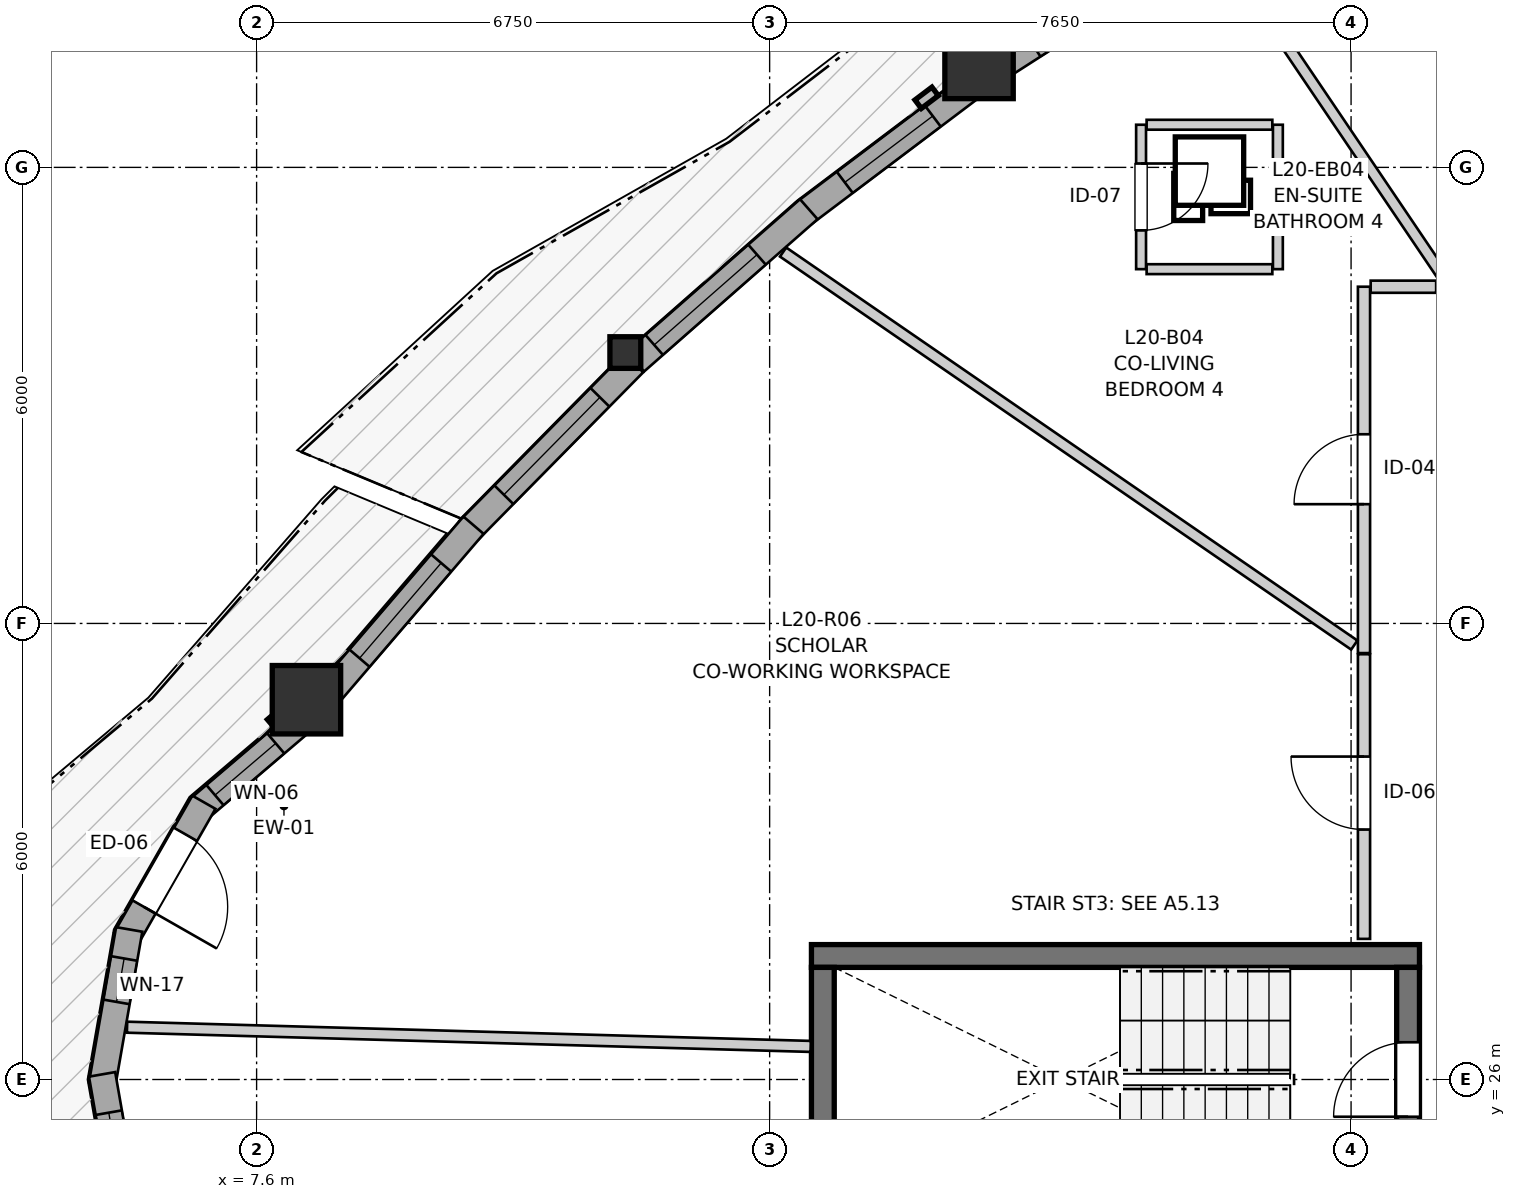
"""IFC4 building model, lengths in metres.
Left out: names, types, materials, properties, quantities, classifications, styles, units other than length and angle.
Written with IfcOpenShell. Run it as: python <this file> out.ifc"""

import sys

from ifc_helpers import new_model, si_unit, direction, frame, frame_2d, origin, origin_2d, place, context, subcontext, project, spatial, rectangle, i_section, extrude, source, transform, mapped, element, fill, save


model = new_model("IFC4")
c1 = context("Model", 3, precision=1e-05, world=origin(), true_north=direction((0.0, 1.0)))
c2 = subcontext(c1, "Body", "Model", "MODEL_VIEW")
j1 = project(units=[si_unit("LENGTHUNIT", "METRE"), si_unit("PLANEANGLEUNIT", "RADIAN")], contexts=[c1])
p1 = place(None, origin())
s1 = spatial("IfcSite", under=j1, at=p1, CompositionType="ELEMENT")
p2 = place(p1, origin())
s2 = spatial("IfcBuilding", under=s1, at=p2, CompositionType="ELEMENT")
p3 = place(p2, frame((0.0, 0.0, 70.4)))
s3 = spatial("IfcBuildingStorey", under=s2, at=p3, CompositionType="ELEMENT", Elevation=70.4)
p4 = place(p3, frame((22.9, 27.625, 0.0), z_axis=(0.0, 0.0, 1.0), x_axis=(-1.0, 0.0, 0.0)))
e1 = element("IfcWall", 1, at=p4, inside=s3, PredefinedType="SHEAR", context=c2, shape_type="SweptSolid", body=[
    extrude(rectangle(XDim=8.0, YDim=0.3, at=frame_2d((4.0, 0.0))), origin(), (0.0, 0.0, 1.0), 2.95),
])
p5 = place(p3, frame((15.05, 27.475, 0.0), z_axis=(0.0, 0.0, 1.0), x_axis=(0.0, -1.0, 0.0)))
e2 = element("IfcWall", 2, at=p5, inside=s3, PredefinedType="SHEAR", context=c2, shape_type="SweptSolid", body=[
    extrude(rectangle(XDim=2.95, YDim=0.3, at=frame_2d((1.475, 0.0))), origin(), (0.0, 0.0, 1.0), 2.95),
])
p6 = place(p3, frame((22.75, 24.525, 0.0), z_axis=(0.0, 0.0, 1.0), x_axis=(0.0, 1.0, 0.0)))
e3 = element("IfcWall", 3, at=p6, inside=s3, PredefinedType="SHEAR", context=c2, shape_type="SweptSolid", body=[
    extrude(rectangle(XDim=2.95, YDim=0.3, at=frame_2d((1.475, 0.0))), origin(), (0.0, 0.0, 1.0), 2.95),
])
p7 = place(p6, frame((0.985, 0.0, 0.0)))
e4 = element("IfcOpeningElement", 4, at=p7, cuts=e3, PredefinedType="OPENING", context=c2, shape_type="SweptSolid", body=[
    extrude(rectangle(XDim=0.98, YDim=2.15, at=frame_2d((0.49, 1.075))), frame((0.0, 0.16, 0.0), z_axis=(0.0, -1.0, 0.0), x_axis=(1.0, 0.0, 0.0)), (0.0, 0.0, 1.0), 0.32),
])
m1 = source(origin(), c2, "Body", "SweptSolid", [
    extrude(rectangle(XDim=0.9, YDim=0.9, at=origin_2d()), origin(), (0.0, 0.0, 1.0), 2.95),
])
for number, where, z_axis, x_axis in (
    (5, (8.256, 30.997, 0.0), (0.0, 0.0, 1.0), (1.0, 0.0, 0.0)),
    (6, (17.105, 39.354, 0.0), (0.0, 0.0, 1.0), (1.0, 0.0, 0.0)),
):
    element("IfcColumn", number, at=place(p3, frame(where, z_axis=z_axis, x_axis=x_axis)), inside=s3, PredefinedType="COLUMN", context=c2, shape_type="MappedRepresentation", body=[
        mapped(m1, transform((0.0, 0.0, 0.0), x_axis=(1.0, 0.0, 0.0), y_axis=(0.0, 1.0, 0.0), z_axis=(0.0, 0.0, 1.0), scale=1.0)),
    ])
m2 = source(origin(), c2, "Body", "SweptSolid", [
    extrude(i_section(OverallWidth=0.406, OverallDepth=0.416, WebThickness=0.027, FlangeThickness=0.044, FilletRadius=0.015, at=origin_2d()), origin(), (0.0, 0.0, 1.0), 2.95),
])
p8 = place(p3, frame((12.451, 35.564, 0.0), z_axis=(0.0, 0.0, 1.0), x_axis=(1.0, 0.0, 0.0)))
e7 = element("IfcColumn", 7, at=p8, inside=s3, PredefinedType="PILASTER", context=c2, shape_type="MappedRepresentation", body=[
    mapped(m2, transform((0.0, 0.0, 0.0), x_axis=(1.0, 0.0, 0.0), y_axis=(0.0, 1.0, 0.0), z_axis=(0.0, 0.0, 1.0), scale=1.0)),
])
p9 = place(p3, frame((8.198, 30.717, 0.0), z_axis=(0.0, 0.0, 1.0), x_axis=(-0.761176639947, -0.648544618973, 0.0)))
e8 = element("IfcWall", 8, at=p9, inside=s3, PredefinedType="SOLIDWALL", context=c2, shape_type="SweptSolid", body=[
    extrude(rectangle(XDim=1.81, YDim=0.35, at=frame_2d((0.905, 0.0))), origin(), (0.0, 0.0, 1.0), 2.48),
])
p10 = place(p9, frame((0.455, 0.0, 0.82)))
e9 = element("IfcOpeningElement", 9, at=p10, cuts=e8, PredefinedType="OPENING", context=c2, shape_type="SweptSolid", body=[
    extrude(rectangle(XDim=1.05, YDim=1.45, at=frame_2d((0.525, 0.725))), frame((0.0, 0.185, 0.0), z_axis=(0.0, -1.0, 0.0), x_axis=(1.0, 0.0, 0.0)), (0.0, 0.0, 1.0), 0.37),
])
p11 = place(p3, frame((6.906, 29.647, 0.0), z_axis=(0.0, 0.0, 1.0), x_axis=(-0.496037473582, -0.868301114132, 0.0)))
e10 = element("IfcWall", 10, at=p11, inside=s3, PredefinedType="SOLIDWALL", context=c2, shape_type="SweptSolid", body=[
    extrude(rectangle(XDim=2.073, YDim=0.35, at=frame_2d((1.037, 0.0))), origin(), (0.0, 0.0, 1.0), 2.48),
])
p12 = place(p11, frame((0.487, 0.0, 0.0)))
e11 = element("IfcOpeningElement", 11, at=p12, cuts=e10, PredefinedType="OPENING", context=c2, shape_type="SweptSolid", body=[
    extrude(rectangle(XDim=1.1, YDim=2.1, at=frame_2d((0.55, 1.05))), frame((0.0, 0.185, 0.0), z_axis=(0.0, -1.0, 0.0), x_axis=(1.0, 0.0, 0.0)), (0.0, 0.0, 1.0), 0.37),
])
p13 = place(p3, frame((5.924, 27.975, 0.0), z_axis=(0.0, 0.0, 1.0), x_axis=(-0.172166087538, -0.985067935881, 0.0)))
e12 = element("IfcWall", 12, at=p13, inside=s3, PredefinedType="SOLIDWALL", context=c2, shape_type="SweptSolid", body=[
    extrude(rectangle(XDim=2.073, YDim=0.35, at=frame_2d((1.037, 0.0))), origin(), (0.0, 0.0, 1.0), 2.48),
])
p14 = place(p13, frame((0.388, 0.0, 0.82)))
e13 = element("IfcOpeningElement", 13, at=p14, cuts=e12, PredefinedType="OPENING", context=c2, shape_type="SweptSolid", body=[
    extrude(rectangle(XDim=0.58, YDim=1.35, at=frame_2d((0.29, 0.675))), frame((0.0, 0.185, 0.0), z_axis=(0.0, -1.0, 0.0), x_axis=(1.0, 0.0, 0.0)), (0.0, 0.0, 1.0), 0.37),
])
p15 = place(p3, frame((5.567, 26.068, 0.0), z_axis=(0.0, 0.0, 1.0), x_axis=(0.172166087538, -0.985067935881, 0.0)))
e14 = element("IfcWall", 14, at=p15, inside=s3, PredefinedType="SOLIDWALL", context=c2, shape_type="SweptSolid", body=[
    extrude(rectangle(XDim=2.073, YDim=0.35, at=frame_2d((1.037, 0.0))), origin(), (0.0, 0.0, 1.0), 2.48),
])
p16 = place(p15, frame((0.511, 0.0, 0.82)))
e15 = element("IfcOpeningElement", 15, at=p16, cuts=e14, PredefinedType="OPENING", context=c2, shape_type="SweptSolid", body=[
    extrude(rectangle(XDim=1.05, YDim=1.45, at=frame_2d((0.525, 0.725))), frame((0.0, 0.185, 0.0), z_axis=(0.0, -1.0, 0.0), x_axis=(1.0, 0.0, 0.0)), (0.0, 0.0, 1.0), 0.37),
])
p17 = place(p3, frame((19.73, 40.831, 0.0), z_axis=(0.0, 0.0, 1.0), x_axis=(-0.841577423868, -0.540136500929, 0.0)))
e16 = element("IfcWall", 16, at=p17, inside=s3, PredefinedType="SOLIDWALL", context=c2, shape_type="SweptSolid", body=[
    extrude(rectangle(XDim=2.782, YDim=0.35, at=frame_2d((1.391, 0.0))), origin(), (0.0, 0.0, 1.0), 2.48),
])
p18 = place(p17, frame((0.521, 0.0, 0.82)))
e17 = element("IfcOpeningElement", 17, at=p18, cuts=e16, PredefinedType="OPENING", context=c2, shape_type="SweptSolid", body=[
    extrude(rectangle(XDim=1.75, YDim=1.3, at=frame_2d((0.875, 0.65))), frame((0.0, 0.185, 0.0), z_axis=(0.0, -1.0, 0.0), x_axis=(1.0, 0.0, 0.0)), (0.0, 0.0, 1.0), 0.37),
])
p19 = place(p3, frame((17.031, 39.079, 0.0), z_axis=(0.0, 0.0, 1.0), x_axis=(-0.798385341516, -0.602146864521, 0.0)))
e18 = element("IfcWall", 18, at=p19, inside=s3, PredefinedType="SOLIDWALL", context=c2, shape_type="SweptSolid", body=[
    extrude(rectangle(XDim=2.799, YDim=0.35, at=frame_2d((1.4, 0.0))), origin(), (0.0, 0.0, 1.0), 2.48),
])
p20 = place(p19, frame((0.67, 0.0, 0.82)))
e19 = element("IfcOpeningElement", 19, at=p20, cuts=e18, PredefinedType="OPENING", context=c2, shape_type="SweptSolid", body=[
    extrude(rectangle(XDim=1.45, YDim=1.25, at=frame_2d((0.725, 0.625))), frame((0.0, 0.185, 0.0), z_axis=(0.0, -1.0, 0.0), x_axis=(1.0, 0.0, 0.0)), (0.0, 0.0, 1.0), 0.37),
])
p21 = place(p3, frame((14.865, 37.45, 0.0), z_axis=(0.0, 0.0, 1.0), x_axis=(-0.751505335107, -0.659727012715, 0.0)))
e20 = element("IfcWall", 20, at=p21, inside=s3, PredefinedType="SOLIDWALL", context=c2, shape_type="SweptSolid", body=[
    extrude(rectangle(XDim=3.038, YDim=0.35, at=frame_2d((1.519, 0.0))), origin(), (0.0, 0.0, 1.0), 2.48),
])
p22 = place(p21, frame((0.906, 0.0, 0.82)))
e21 = element("IfcOpeningElement", 21, at=p22, cuts=e20, PredefinedType="OPENING", context=c2, shape_type="SweptSolid", body=[
    extrude(rectangle(XDim=1.8, YDim=1.45, at=frame_2d((0.9, 0.725))), frame((0.0, 0.185, 0.0), z_axis=(0.0, -1.0, 0.0), x_axis=(1.0, 0.0, 0.0)), (0.0, 0.0, 1.0), 0.37),
])
p23 = place(p3, frame((12.562, 35.427, 0.0), z_axis=(0.0, 0.0, 1.0), x_axis=(-0.701949387032, -0.712226830473, 0.0)))
e22 = element("IfcWall", 22, at=p23, inside=s3, PredefinedType="SOLIDWALL", context=c2, shape_type="SweptSolid", body=[
    extrude(rectangle(XDim=3.088, YDim=0.35, at=frame_2d((1.544, 0.0))), origin(), (0.0, 0.0, 1.0), 2.48),
])
p24 = place(p23, frame((0.634, 0.0, 0.82)))
e23 = element("IfcOpeningElement", 23, at=p24, cuts=e22, PredefinedType="OPENING", context=c2, shape_type="SweptSolid", body=[
    extrude(rectangle(XDim=1.8, YDim=1.45, at=frame_2d((0.9, 0.725))), frame((0.0, 0.185, 0.0), z_axis=(0.0, -1.0, 0.0), x_axis=(1.0, 0.0, 0.0)), (0.0, 0.0, 1.0), 0.37),
])
p25 = place(p3, frame((10.454, 33.292, 0.0), z_axis=(0.0, 0.0, 1.0), x_axis=(-0.650791373456, -0.759256602365, 0.0)))
e24 = element("IfcWall", 24, at=p25, inside=s3, PredefinedType="SOLIDWALL", context=c2, shape_type="SweptSolid", body=[
    extrude(rectangle(XDim=2.949, YDim=0.35, at=frame_2d((1.474, 0.0))), origin(), (0.0, 0.0, 1.0), 2.48),
])
p26 = place(p25, frame((0.654, 0.0, 0.82)))
e25 = element("IfcOpeningElement", 25, at=p26, cuts=e24, PredefinedType="OPENING", context=c2, shape_type="SweptSolid", body=[
    extrude(rectangle(XDim=1.65, YDim=1.45, at=frame_2d((0.825, 0.725))), frame((0.0, 0.185, 0.0), z_axis=(0.0, -1.0, 0.0), x_axis=(1.0, 0.0, 0.0)), (0.0, 0.0, 1.0), 0.37),
])
p27 = place(p3, frame((22.17, 31.61, 0.0), z_axis=(0.0, 0.0, 1.0), x_axis=(0.0, 1.0, 0.0)))
e26 = element("IfcWall", 26, at=p27, inside=s3, PredefinedType="PARTITIONING", context=c2, shape_type="SweptSolid", body=[
    extrude(rectangle(XDim=4.82, YDim=0.16, at=frame_2d((2.41, 0.0))), origin(), (0.0, 0.0, 1.0), 2.95),
])
p28 = place(p27, frame((1.959, 0.0, 0.0)))
e27 = element("IfcOpeningElement", 27, at=p28, cuts=e26, PredefinedType="OPENING", context=c2, shape_type="SweptSolid", body=[
    extrude(rectangle(XDim=0.92, YDim=2.1, at=frame_2d((0.46, 1.05))), frame((0.0, 0.09, 0.0), z_axis=(0.0, -1.0, 0.0), x_axis=(1.0, 0.0, 0.0)), (0.0, 0.0, 1.0), 0.18),
])
p29 = place(p3, frame((22.17, 27.85, 0.0), z_axis=(0.0, 0.0, 1.0), x_axis=(0.0, 1.0, 0.0)))
e28 = element("IfcWall", 28, at=p29, inside=s3, PredefinedType="PARTITIONING", context=c2, shape_type="SweptSolid", body=[
    extrude(rectangle(XDim=3.745, YDim=0.16, at=frame_2d((1.873, 0.0))), origin(), (0.0, 0.0, 1.0), 2.95),
])
p30 = place(p29, frame((1.438, 0.0, 0.0)))
e29 = element("IfcOpeningElement", 29, at=p30, cuts=e28, PredefinedType="OPENING", context=c2, shape_type="SweptSolid", body=[
    extrude(rectangle(XDim=0.96, YDim=2.1, at=frame_2d((0.48, 1.05))), frame((0.0, 0.09, 0.0), z_axis=(0.0, -1.0, 0.0), x_axis=(1.0, 0.0, 0.0)), (0.0, 0.0, 1.0), 0.18),
])
p31 = place(p3, frame((19.237, 38.561, 0.0), z_axis=(0.0, 0.0, 1.0), x_axis=(0.0, -1.0, 0.0)))
e30 = element("IfcWall", 30, at=p31, inside=s3, PredefinedType="PARTITIONING", context=c2, shape_type="SweptSolid", body=[
    extrude(rectangle(XDim=1.9, YDim=0.13, at=frame_2d((0.95, 0.0))), origin(), (0.0, 0.0, 1.0), 2.95),
])
p32 = place(p31, frame((0.51, 0.0, 0.0)))
e31 = element("IfcOpeningElement", 31, at=p32, cuts=e30, PredefinedType="OPENING", context=c2, shape_type="SweptSolid", body=[
    extrude(rectangle(XDim=0.88, YDim=2.05, at=frame_2d((0.44, 1.025))), frame((0.0, 0.075, 0.0), z_axis=(0.0, -1.0, 0.0), x_axis=(1.0, 0.0, 0.0)), (0.0, 0.0, 1.0), 0.15),
])
p33 = place(p3, frame((14.527, 36.886, 0.0), z_axis=(0.0, 0.0, 1.0), x_axis=(0.823849772282, -0.566808215106, 0.0)))
e32 = element("IfcWall", 32, at=p33, inside=s3, PredefinedType="PARTITIONING", context=c2, shape_type="SweptSolid", body=[
    extrude(rectangle(XDim=9.122, YDim=0.145, at=frame_2d((4.561, 0.0))), origin(), (0.0, 0.0, 1.0), 2.95),
])
p34 = place(p3, frame((5.896, 26.688, 0.0), z_axis=(0.0, 0.0, 1.0), x_axis=(0.999604843423, -0.028109731489, 0.0)))
e33 = element("IfcWall", 33, at=p34, inside=s3, PredefinedType="PARTITIONING", context=c2, shape_type="SweptSolid", body=[
    extrude(rectangle(XDim=8.998, YDim=0.145, at=frame_2d((4.499, 0.0))), origin(), (0.0, 0.0, 1.0), 2.95),
])
p35 = place(p3, frame((20.277, 40.906, 0.0), z_axis=(0.0, 0.0, 1.0), x_axis=(0.559905741259, -0.828556311246, 0.0)))
e34 = element("IfcWall", 34, at=p35, inside=s3, PredefinedType="PARTITIONING", context=c2, shape_type="SweptSolid", body=[
    extrude(rectangle(XDim=5.249, YDim=0.145, at=frame_2d((2.625, 0.0))), origin(), (0.0, 0.0, 1.0), 2.95),
])
p36 = place(p3, frame((21.037, 36.661, 0.0), z_axis=(0.0, 0.0, 1.0), x_axis=(0.0, 1.0, 0.0)))
e35 = element("IfcWall", 35, at=p36, inside=s3, PredefinedType="PARTITIONING", context=c2, shape_type="SweptSolid", body=[
    extrude(rectangle(XDim=1.9, YDim=0.13, at=frame_2d((0.95, 0.0))), origin(), (0.0, 0.0, 1.0), 2.95),
])
for number, where, z_axis, x_axis in (
    (36, (19.31, 38.561, 0.0), (0.0, 0.0, 1.0), (1.0, 0.0, 0.0)),
    (37, (19.31, 36.661, 0.0), (0.0, 0.0, 1.0), (1.0, 0.0, 0.0)),
):
    element("IfcWall", number, at=place(p3, frame(where, z_axis=z_axis, x_axis=x_axis)), inside=s3, PredefinedType="PARTITIONING", context=c2, shape_type="SweptSolid", body=[
        extrude(rectangle(XDim=1.654, YDim=0.13, at=frame_2d((0.827, 0.0))), origin(), (0.0, 0.0, 1.0), 2.95),
    ])
p37 = place(p3, frame((22.258, 36.43, 0.0), z_axis=(0.0, 0.0, 1.0), x_axis=(1.0, 0.0, 0.0)))
e38 = element("IfcWall", 38, at=p37, inside=s3, PredefinedType="PARTITIONING", context=c2, shape_type="SweptSolid", body=[
    extrude(rectangle(XDim=0.861, YDim=0.16, at=frame_2d((0.431, 0.0))), origin(), (0.0, 0.0, 1.0), 2.95),
])
m3 = source(origin(), c2, "Body", "SweptSolid", [
    extrude(rectangle(XDim=1.05, YDim=1.45, at=frame_2d((0.525, 0.725))), frame((0.0, 0.03, 0.0), z_axis=(0.0, -1.0, 0.0), x_axis=(1.0, 0.0, 0.0)), (0.0, 0.0, 1.0), 0.06),
])
p38 = place(p10, origin())
e39 = element("IfcWindow", 39, at=p38, inside=s3, PartitioningType="SINGLE_PANEL", PredefinedType="WINDOW", context=c2, shape_type="MappedRepresentation", body=[
    mapped(m3, transform((0.0, 0.0, 0.0), x_axis=(1.0, 0.0, 0.0), y_axis=(0.0, 1.0, 0.0), z_axis=(0.0, 0.0, 1.0), scale=1.0)),
])
fill(e9, e39)
m4 = source(origin(), c2, "Body", "SweptSolid", [
    extrude(rectangle(XDim=1.1, YDim=2.1, at=frame_2d((0.55, 1.05))), frame((0.0, 0.025, 0.0), z_axis=(0.0, -1.0, 0.0), x_axis=(1.0, 0.0, 0.0)), (0.0, 0.0, 1.0), 0.05),
])
p39 = place(p12, origin())
e40 = element("IfcDoor", 40, at=p39, inside=s3, OperationType="SINGLE_SWING_RIGHT", PredefinedType="DOOR", context=c2, shape_type="MappedRepresentation", body=[
    mapped(m4, transform((0.0, 0.0, 0.0), x_axis=(1.0, 0.0, 0.0), y_axis=(0.0, 1.0, 0.0), z_axis=(0.0, 0.0, 1.0), scale=1.0)),
])
fill(e11, e40)
m5 = source(origin(), c2, "Body", "SweptSolid", [
    extrude(rectangle(XDim=0.58, YDim=1.35, at=frame_2d((0.29, 0.675))), frame((0.0, 0.03, 0.0), z_axis=(0.0, -1.0, 0.0), x_axis=(1.0, 0.0, 0.0)), (0.0, 0.0, 1.0), 0.06),
])
p40 = place(p14, origin())
e41 = element("IfcWindow", 41, at=p40, inside=s3, PartitioningType="SINGLE_PANEL", PredefinedType="WINDOW", context=c2, shape_type="MappedRepresentation", body=[
    mapped(m5, transform((0.0, 0.0, 0.0), x_axis=(1.0, 0.0, 0.0), y_axis=(0.0, 1.0, 0.0), z_axis=(0.0, 0.0, 1.0), scale=1.0)),
])
fill(e13, e41)
p41 = place(p16, origin())
e42 = element("IfcWindow", 42, at=p41, inside=s3, PartitioningType="SINGLE_PANEL", PredefinedType="WINDOW", context=c2, shape_type="MappedRepresentation", body=[
    mapped(m3, transform((0.0, 0.0, 0.0), x_axis=(1.0, 0.0, 0.0), y_axis=(0.0, 1.0, 0.0), z_axis=(0.0, 0.0, 1.0), scale=1.0)),
])
fill(e15, e42)
m6 = source(origin(), c2, "Body", "SweptSolid", [
    extrude(rectangle(XDim=1.45, YDim=1.25, at=frame_2d((0.725, 0.625))), frame((0.0, 0.03, 0.0), z_axis=(0.0, -1.0, 0.0), x_axis=(1.0, 0.0, 0.0)), (0.0, 0.0, 1.0), 0.06),
])
p42 = place(p20, origin())
e43 = element("IfcWindow", 43, at=p42, inside=s3, PartitioningType="SINGLE_PANEL", PredefinedType="WINDOW", context=c2, shape_type="MappedRepresentation", body=[
    mapped(m6, transform((0.0, 0.0, 0.0), x_axis=(1.0, 0.0, 0.0), y_axis=(0.0, 1.0, 0.0), z_axis=(0.0, 0.0, 1.0), scale=1.0)),
])
fill(e19, e43)
m7 = source(origin(), c2, "Body", "SweptSolid", [
    extrude(rectangle(XDim=1.8, YDim=1.45, at=frame_2d((0.9, 0.725))), frame((0.0, 0.03, 0.0), z_axis=(0.0, -1.0, 0.0), x_axis=(1.0, 0.0, 0.0)), (0.0, 0.0, 1.0), 0.06),
])
p43 = place(p22, origin())
e44 = element("IfcWindow", 44, at=p43, inside=s3, PartitioningType="SINGLE_PANEL", PredefinedType="WINDOW", context=c2, shape_type="MappedRepresentation", body=[
    mapped(m7, transform((0.0, 0.0, 0.0), x_axis=(1.0, 0.0, 0.0), y_axis=(0.0, 1.0, 0.0), z_axis=(0.0, 0.0, 1.0), scale=1.0)),
])
fill(e21, e44)
p44 = place(p24, origin())
e45 = element("IfcWindow", 45, at=p44, inside=s3, PartitioningType="SINGLE_PANEL", PredefinedType="WINDOW", context=c2, shape_type="MappedRepresentation", body=[
    mapped(m7, transform((0.0, 0.0, 0.0), x_axis=(1.0, 0.0, 0.0), y_axis=(0.0, 1.0, 0.0), z_axis=(0.0, 0.0, 1.0), scale=1.0)),
])
fill(e23, e45)
m8 = source(origin(), c2, "Body", "SweptSolid", [
    extrude(rectangle(XDim=1.65, YDim=1.45, at=frame_2d((0.825, 0.725))), frame((0.0, 0.03, 0.0), z_axis=(0.0, -1.0, 0.0), x_axis=(1.0, 0.0, 0.0)), (0.0, 0.0, 1.0), 0.06),
])
p45 = place(p26, origin())
e46 = element("IfcWindow", 46, at=p45, inside=s3, PartitioningType="SINGLE_PANEL", PredefinedType="WINDOW", context=c2, shape_type="MappedRepresentation", body=[
    mapped(m8, transform((0.0, 0.0, 0.0), x_axis=(1.0, 0.0, 0.0), y_axis=(0.0, 1.0, 0.0), z_axis=(0.0, 0.0, 1.0), scale=1.0)),
])
fill(e25, e46)
m9 = source(origin(), c2, "Body", "SweptSolid", [
    extrude(rectangle(XDim=0.98, YDim=2.15, at=frame_2d((0.49, 1.075))), frame((0.0, 0.025, 0.0), z_axis=(0.0, -1.0, 0.0), x_axis=(1.0, 0.0, 0.0)), (0.0, 0.0, 1.0), 0.05),
])
p46 = place(p7, origin())
e47 = element("IfcDoor", 47, at=p46, inside=s3, OperationType="SINGLE_SWING_LEFT", PredefinedType="DOOR", context=c2, shape_type="MappedRepresentation", body=[
    mapped(m9, transform((0.0, 0.0, 0.0), x_axis=(1.0, 0.0, 0.0), y_axis=(0.0, 1.0, 0.0), z_axis=(0.0, 0.0, 1.0), scale=1.0)),
])
fill(e4, e47)
m10 = source(origin(), c2, "Body", "SweptSolid", [
    extrude(rectangle(XDim=0.92, YDim=2.1, at=frame_2d((0.46, 1.05))), frame((0.0, 0.025, 0.0), z_axis=(0.0, -1.0, 0.0), x_axis=(1.0, 0.0, 0.0)), (0.0, 0.0, 1.0), 0.05),
])
p47 = place(p28, origin())
e48 = element("IfcDoor", 48, at=p47, inside=s3, OperationType="SINGLE_SWING_LEFT", PredefinedType="DOOR", context=c2, shape_type="MappedRepresentation", body=[
    mapped(m10, transform((0.0, 0.0, 0.0), x_axis=(1.0, 0.0, 0.0), y_axis=(0.0, 1.0, 0.0), z_axis=(0.0, 0.0, 1.0), scale=1.0)),
])
fill(e27, e48)
m11 = source(origin(), c2, "Body", "SweptSolid", [
    extrude(rectangle(XDim=0.96, YDim=2.1, at=frame_2d((0.48, 1.05))), frame((0.0, 0.025, 0.0), z_axis=(0.0, -1.0, 0.0), x_axis=(1.0, 0.0, 0.0)), (0.0, 0.0, 1.0), 0.05),
])
p48 = place(p30, origin())
e49 = element("IfcDoor", 49, at=p48, inside=s3, OperationType="SINGLE_SWING_RIGHT", PredefinedType="DOOR", context=c2, shape_type="MappedRepresentation", body=[
    mapped(m11, transform((0.0, 0.0, 0.0), x_axis=(1.0, 0.0, 0.0), y_axis=(0.0, 1.0, 0.0), z_axis=(0.0, 0.0, 1.0), scale=1.0)),
])
fill(e29, e49)
m12 = source(origin(), c2, "Body", "SweptSolid", [
    extrude(rectangle(XDim=0.88, YDim=2.05, at=frame_2d((0.44, 1.025))), frame((0.0, 0.025, 0.0), z_axis=(0.0, -1.0, 0.0), x_axis=(1.0, 0.0, 0.0)), (0.0, 0.0, 1.0), 0.05),
])
p49 = place(p32, origin())
e50 = element("IfcDoor", 50, at=p49, inside=s3, OperationType="SINGLE_SWING_LEFT", PredefinedType="DOOR", context=c2, shape_type="MappedRepresentation", body=[
    mapped(m12, transform((0.0, 0.0, 0.0), x_axis=(1.0, 0.0, 0.0), y_axis=(0.0, 1.0, 0.0), z_axis=(0.0, 0.0, 1.0), scale=1.0)),
])
fill(e31, e50)
save(model, sys.argv[1])
